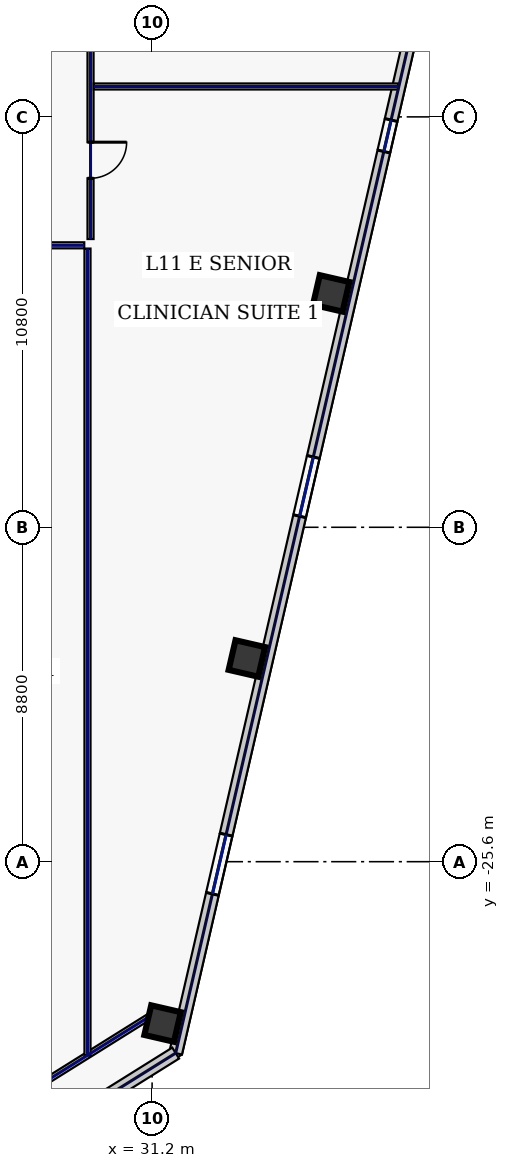
"""IFC4 building model, lengths in metres.
Left out: names, types, materials, properties, quantities, classifications, styles, units other than length and angle.
Written with IfcOpenShell. Run it as: python <this file> out.ifc"""

import sys

from ifc_helpers import new_model, si_unit, direction, frame, frame_2d, origin, origin_2d, place, context, subcontext, project, spatial, rectangle, hollow_rectangle, extrude, element, fill, save


model = new_model("IFC4")
c1 = context("Model", 3, precision=1e-05, world=origin(), true_north=direction((0.0, 1.0)))
c2 = subcontext(c1, "Body", "Model", "MODEL_VIEW")
j1 = project(units=[si_unit("LENGTHUNIT", "METRE"), si_unit("PLANEANGLEUNIT", "RADIAN")], contexts=[c1])
p1 = place(None, origin())
s1 = spatial("IfcSite", under=j1, at=p1, CompositionType="ELEMENT")
p2 = place(p1, origin())
s2 = spatial("IfcBuilding", under=s1, at=p2, CompositionType="ELEMENT")
p3 = place(p2, frame((0.0, 0.0, 55.4)))
s3 = spatial("IfcBuildingStorey", under=s2, at=p3, CompositionType="ELEMENT", Elevation=55.4)
for number, where, z_axis, x_axis in (
    (1, (31.476, -29.86, 0.0), (0.0, 0.0, 1.0), (0.974, -0.225, 0.0)),
    (2, (33.694, -20.252, 0.0), (0.0, 0.0, 1.0), (0.974, -0.225, 0.0)),
    (3, (35.912, -10.645, 0.0), (0.0, 0.0, 1.0), (0.974, -0.225, 0.0)),
):
    element("IfcColumn", number, at=place(p3, frame(where, z_axis=z_axis, x_axis=x_axis)), inside=s3, PredefinedType="COLUMN", context=c2, shape_type="SweptSolid", body=[
        extrude(hollow_rectangle(XDim=0.8, YDim=0.8, WallThickness=0.036, at=origin_2d()), origin(), (0.0, 0.0, 1.0), 3.74),
    ])
p4 = place(p3, frame((31.82, -30.637, 0.0), z_axis=(0.0, 0.0, 1.0), x_axis=(0.224949969076, 0.974370315338, 0.0)))
e4 = element("IfcWall", 4, at=p4, inside=s3, PredefinedType="STANDARD", context=c2, shape_type="SweptSolid", body=[
    extrude(rectangle(XDim=40.8, YDim=0.34, at=frame_2d((20.4, 0.0))), origin(), (0.0, 0.0, 1.0), 3.74),
])
p5 = place(p4, frame((4.3, 0.0, 0.58)))
e5 = element("IfcOpeningElement", 5, at=p5, cuts=e4, PredefinedType="OPENING", context=c2, shape_type="SweptSolid", body=[
    extrude(rectangle(XDim=1.6, YDim=2.3, at=frame_2d((0.8, 1.15))), frame((0.0, 0.18, 0.0), z_axis=(0.0, -1.0, 0.0), x_axis=(1.0, 0.0, 0.0)), (0.0, 0.0, 1.0), 0.36),
])
p6 = place(p4, frame((14.5, 0.0, 0.58)))
e6 = element("IfcOpeningElement", 6, at=p6, cuts=e4, PredefinedType="OPENING", context=c2, shape_type="SweptSolid", body=[
    extrude(rectangle(XDim=1.6, YDim=2.3, at=frame_2d((0.8, 1.15))), frame((0.0, 0.18, 0.0), z_axis=(0.0, -1.0, 0.0), x_axis=(1.0, 0.0, 0.0)), (0.0, 0.0, 1.0), 0.36),
])
p7 = place(p4, frame((24.35, 0.0, 0.75)))
e7 = element("IfcOpeningElement", 7, at=p7, cuts=e4, PredefinedType="OPENING", context=c2, shape_type="SweptSolid", body=[
    extrude(rectangle(XDim=0.85, YDim=1.85, at=frame_2d((0.425, 0.925))), frame((0.0, 0.18, 0.0), z_axis=(0.0, -1.0, 0.0), x_axis=(1.0, 0.0, 0.0)), (0.0, 0.0, 1.0), 0.36),
])
p8 = place(p4, frame((34.55, 0.0, 0.75)))
e8 = element("IfcOpeningElement", 8, at=p8, cuts=e4, PredefinedType="OPENING", context=c2, shape_type="SweptSolid", body=[
    extrude(rectangle(XDim=0.85, YDim=1.85, at=frame_2d((0.425, 0.925))), frame((0.0, 0.18, 0.0), z_axis=(0.0, -1.0, 0.0), x_axis=(1.0, 0.0, 0.0)), (0.0, 0.0, 1.0), 0.36),
])
p9 = place(p3, frame((25.788, -34.406, 0.0), z_axis=(0.0, 0.0, 1.0), x_axis=(0.848046504656, 0.529921811158, 0.0)))
e9 = element("IfcWall", 9, at=p9, inside=s3, PredefinedType="STANDARD", context=c2, shape_type="SweptSolid", body=[
    extrude(rectangle(XDim=7.113, YDim=0.34, at=frame_2d((3.557, 0.0))), origin(), (0.0, 0.0, 1.0), 3.74),
])
p10 = place(p3, frame((25.06, -33.468, 0.0), z_axis=(0.0, 0.0, 1.0), x_axis=(0.848043064089, 0.529927317139, 0.0)))
e10 = element("IfcWall", 10, at=p10, inside=s3, PredefinedType="PARTITIONING", context=c2, shape_type="SweptSolid", body=[
    extrude(rectangle(XDim=7.354, YDim=0.16, at=frame_2d((3.677, 0.0))), origin(), (0.0, 0.0, 1.0), 3.74),
])
p11 = place(p3, frame((29.58, 9.415, 0.0), z_axis=(0.0, 0.0, 1.0), x_axis=(0.0, -1.0, 0.0)))
e11 = element("IfcWall", 11, at=p11, inside=s3, PredefinedType="PARTITIONING", context=c2, shape_type="SweptSolid", body=[
    extrude(rectangle(XDim=18.63, YDim=0.16, at=frame_2d((9.315, 0.0))), origin(), (0.0, 0.0, 1.0), 3.74),
])
p12 = place(p11, frame((16.081, 0.0, 0.0)))
e12 = element("IfcOpeningElement", 12, at=p12, cuts=e11, PredefinedType="OPENING", context=c2, shape_type="SweptSolid", body=[
    extrude(rectangle(XDim=0.95, YDim=2.2, at=frame_2d((0.475, 1.1))), frame((0.0, 0.09, 0.0), z_axis=(0.0, -1.0, 0.0), x_axis=(1.0, 0.0, 0.0)), (0.0, 0.0, 1.0), 0.18),
])
p13 = place(p11, frame((12.25, 0.0, 0.0)))
e13 = element("IfcOpeningElement", 13, at=p13, cuts=e11, PredefinedType="OPENING", context=c2, shape_type="SweptSolid", body=[
    extrude(rectangle(XDim=0.95, YDim=2.2, at=frame_2d((0.475, 1.1))), frame((0.0, 0.09, 0.0), z_axis=(0.0, -1.0, 0.0), x_axis=(1.0, 0.0, 0.0)), (0.0, 0.0, 1.0), 0.18),
])
p14 = place(p11, frame((7.05, 0.0, 0.0)))
e14 = element("IfcOpeningElement", 14, at=p14, cuts=e11, PredefinedType="OPENING", context=c2, shape_type="SweptSolid", body=[
    extrude(rectangle(XDim=0.95, YDim=2.2, at=frame_2d((0.475, 1.1))), frame((0.0, 0.09, 0.0), z_axis=(0.0, -1.0, 0.0), x_axis=(1.0, 0.0, 0.0)), (0.0, 0.0, 1.0), 0.18),
])
p15 = place(p11, frame((1.869, 0.0, 0.0)))
e15 = element("IfcOpeningElement", 15, at=p15, cuts=e11, PredefinedType="OPENING", context=c2, shape_type="SweptSolid", body=[
    extrude(rectangle(XDim=0.95, YDim=2.2, at=frame_2d((0.475, 1.1))), frame((0.0, 0.09, 0.0), z_axis=(0.0, -1.0, 0.0), x_axis=(1.0, 0.0, 0.0)), (0.0, 0.0, 1.0), 0.18),
])
p16 = place(p3, frame((29.415, -9.38, 0.0), z_axis=(0.0, 0.0, 1.0), x_axis=(-1.0, 0.0, 0.0)))
e16 = element("IfcWall", 16, at=p16, inside=s3, PredefinedType="PARTITIONING", context=c2, shape_type="SweptSolid", body=[
    extrude(rectangle(XDim=58.83, YDim=0.16, at=frame_2d((29.415, 0.0))), origin(), (0.0, 0.0, 1.0), 3.74),
])
p17 = place(p16, frame((55.831, 0.0, 0.0)))
e17 = element("IfcOpeningElement", 17, at=p17, cuts=e16, PredefinedType="OPENING", context=c2, shape_type="SweptSolid", body=[
    extrude(rectangle(XDim=1.45, YDim=2.2, at=frame_2d((0.725, 1.1))), frame((0.0, 0.09, 0.0), z_axis=(0.0, -1.0, 0.0), x_axis=(1.0, 0.0, 0.0)), (0.0, 0.0, 1.0), 0.18),
])
p18 = place(p16, frame((50.175, 0.0, 0.0)))
e18 = element("IfcOpeningElement", 18, at=p18, cuts=e16, PredefinedType="OPENING", context=c2, shape_type="SweptSolid", body=[
    extrude(rectangle(XDim=1.3, YDim=2.2, at=frame_2d((0.65, 1.1))), frame((0.0, 0.09, 0.0), z_axis=(0.0, -1.0, 0.0), x_axis=(1.0, 0.0, 0.0)), (0.0, 0.0, 1.0), 0.18),
])
p19 = place(p16, frame((44.125, 0.0, 0.0)))
e19 = element("IfcOpeningElement", 19, at=p19, cuts=e16, PredefinedType="OPENING", context=c2, shape_type="SweptSolid", body=[
    extrude(rectangle(XDim=0.95, YDim=2.2, at=frame_2d((0.475, 1.1))), frame((0.0, 0.09, 0.0), z_axis=(0.0, -1.0, 0.0), x_axis=(1.0, 0.0, 0.0)), (0.0, 0.0, 1.0), 0.18),
])
p20 = place(p16, frame((39.175, 0.0, 0.0)))
e20 = element("IfcOpeningElement", 20, at=p20, cuts=e16, PredefinedType="OPENING", context=c2, shape_type="SweptSolid", body=[
    extrude(rectangle(XDim=0.95, YDim=2.2, at=frame_2d((0.475, 1.1))), frame((0.0, 0.09, 0.0), z_axis=(0.0, -1.0, 0.0), x_axis=(1.0, 0.0, 0.0)), (0.0, 0.0, 1.0), 0.18),
])
p21 = place(p16, frame((34.0, 0.0, 0.0)))
e21 = element("IfcOpeningElement", 21, at=p21, cuts=e16, PredefinedType="OPENING", context=c2, shape_type="SweptSolid", body=[
    extrude(rectangle(XDim=0.95, YDim=2.2, at=frame_2d((0.475, 1.1))), frame((0.0, 0.09, 0.0), z_axis=(0.0, -1.0, 0.0), x_axis=(1.0, 0.0, 0.0)), (0.0, 0.0, 1.0), 0.18),
])
p22 = place(p16, frame((28.6, 0.0, 0.0)))
e22 = element("IfcOpeningElement", 22, at=p22, cuts=e16, PredefinedType="OPENING", context=c2, shape_type="SweptSolid", body=[
    extrude(rectangle(XDim=1.05, YDim=2.2, at=frame_2d((0.525, 1.1))), frame((0.0, 0.09, 0.0), z_axis=(0.0, -1.0, 0.0), x_axis=(1.0, 0.0, 0.0)), (0.0, 0.0, 1.0), 0.18),
])
p23 = place(p16, frame((23.165, 0.0, 0.0)))
e23 = element("IfcOpeningElement", 23, at=p23, cuts=e16, PredefinedType="OPENING", context=c2, shape_type="SweptSolid", body=[
    extrude(rectangle(XDim=0.95, YDim=2.2, at=frame_2d((0.475, 1.1))), frame((0.0, 0.09, 0.0), z_axis=(0.0, -1.0, 0.0), x_axis=(1.0, 0.0, 0.0)), (0.0, 0.0, 1.0), 0.18),
])
p24 = place(p16, frame((18.015, 0.0, 0.0)))
e24 = element("IfcOpeningElement", 24, at=p24, cuts=e16, PredefinedType="OPENING", context=c2, shape_type="SweptSolid", body=[
    extrude(rectangle(XDim=0.95, YDim=2.2, at=frame_2d((0.475, 1.1))), frame((0.0, 0.09, 0.0), z_axis=(0.0, -1.0, 0.0), x_axis=(1.0, 0.0, 0.0)), (0.0, 0.0, 1.0), 0.18),
])
p25 = place(p16, frame((13.275, 0.0, 0.0)))
e25 = element("IfcOpeningElement", 25, at=p25, cuts=e16, PredefinedType="OPENING", context=c2, shape_type="SweptSolid", body=[
    extrude(rectangle(XDim=1.3, YDim=2.2, at=frame_2d((0.65, 1.1))), frame((0.0, 0.09, 0.0), z_axis=(0.0, -1.0, 0.0), x_axis=(1.0, 0.0, 0.0)), (0.0, 0.0, 1.0), 0.18),
])
p26 = place(p16, frame((8.975, 0.0, 0.0)))
e26 = element("IfcOpeningElement", 26, at=p26, cuts=e16, PredefinedType="OPENING", context=c2, shape_type="SweptSolid", body=[
    extrude(rectangle(XDim=1.3, YDim=2.2, at=frame_2d((0.65, 1.1))), frame((0.0, 0.09, 0.0), z_axis=(0.0, -1.0, 0.0), x_axis=(1.0, 0.0, 0.0)), (0.0, 0.0, 1.0), 0.18),
])
p27 = place(p16, frame((4.9, 0.0, 0.0)))
e27 = element("IfcOpeningElement", 27, at=p27, cuts=e16, PredefinedType="OPENING", context=c2, shape_type="SweptSolid", body=[
    extrude(rectangle(XDim=1.3, YDim=2.2, at=frame_2d((0.65, 1.1))), frame((0.0, 0.09, 0.0), z_axis=(0.0, -1.0, 0.0), x_axis=(1.0, 0.0, 0.0)), (0.0, 0.0, 1.0), 0.18),
])
p28 = place(p16, frame((1.419, 0.0, 0.0)))
e28 = element("IfcOpeningElement", 28, at=p28, cuts=e16, PredefinedType="OPENING", context=c2, shape_type="SweptSolid", body=[
    extrude(rectangle(XDim=0.95, YDim=2.2, at=frame_2d((0.475, 1.1))), frame((0.0, 0.09, 0.0), z_axis=(0.0, -1.0, 0.0), x_axis=(1.0, 0.0, 0.0)), (0.0, 0.0, 1.0), 0.18),
])
p29 = place(p3, frame((29.5, -30.703, 0.0), z_axis=(0.0, 0.0, 1.0), x_axis=(0.0, 1.0, 0.0)))
e29 = element("IfcWall", 29, at=p29, inside=s3, PredefinedType="PARTITIONING", context=c2, shape_type="SweptSolid", body=[
    extrude(rectangle(XDim=21.238, YDim=0.16, at=frame_2d((10.619, 0.0))), origin(), (0.0, 0.0, 1.0), 3.74),
])
p30 = place(p3, frame((29.665, -5.2, 0.0), z_axis=(0.0, 0.0, 1.0), x_axis=(1.0, 0.0, 0.0)))
e30 = element("IfcWall", 30, at=p30, inside=s3, PredefinedType="PARTITIONING", context=c2, shape_type="SweptSolid", body=[
    extrude(rectangle(XDim=8.007, YDim=0.16, at=frame_2d((4.003, 0.0))), origin(), (0.0, 0.0, 1.0), 3.74),
])
p31 = place(p5, origin())
e31 = element("IfcWindow", 31, at=p31, inside=s3, PartitioningType="SINGLE_PANEL", PredefinedType="WINDOW", context=c2, shape_type="SweptSolid", body=[
    extrude(rectangle(XDim=1.6, YDim=2.3, at=frame_2d((0.8, 1.15))), frame((0.0, 0.03, 0.0), z_axis=(0.0, -1.0, 0.0), x_axis=(1.0, 0.0, 0.0)), (0.0, 0.0, 1.0), 0.06),
])
fill(e5, e31)
p32 = place(p6, origin())
e32 = element("IfcWindow", 32, at=p32, inside=s3, PartitioningType="SINGLE_PANEL", PredefinedType="WINDOW", context=c2, shape_type="SweptSolid", body=[
    extrude(rectangle(XDim=1.6, YDim=2.3, at=frame_2d((0.8, 1.15))), frame((0.0, 0.03, 0.0), z_axis=(0.0, -1.0, 0.0), x_axis=(1.0, 0.0, 0.0)), (0.0, 0.0, 1.0), 0.06),
])
fill(e6, e32)
p33 = place(p7, origin())
e33 = element("IfcWindow", 33, at=p33, inside=s3, PartitioningType="SINGLE_PANEL", PredefinedType="WINDOW", context=c2, shape_type="SweptSolid", body=[
    extrude(rectangle(XDim=0.85, YDim=1.85, at=frame_2d((0.425, 0.925))), frame((0.0, 0.03, 0.0), z_axis=(0.0, -1.0, 0.0), x_axis=(1.0, 0.0, 0.0)), (0.0, 0.0, 1.0), 0.06),
])
fill(e7, e33)
p34 = place(p12, origin())
e34 = element("IfcDoor", 34, at=p34, inside=s3, OperationType="SINGLE_SWING_LEFT", PredefinedType="DOOR", context=c2, shape_type="SweptSolid", body=[
    extrude(rectangle(XDim=0.95, YDim=2.2, at=frame_2d((0.475, 1.1))), frame((0.0, 0.025, 0.0), z_axis=(0.0, -1.0, 0.0), x_axis=(1.0, 0.0, 0.0)), (0.0, 0.0, 1.0), 0.05),
])
fill(e12, e34)
save(model, sys.argv[1])
